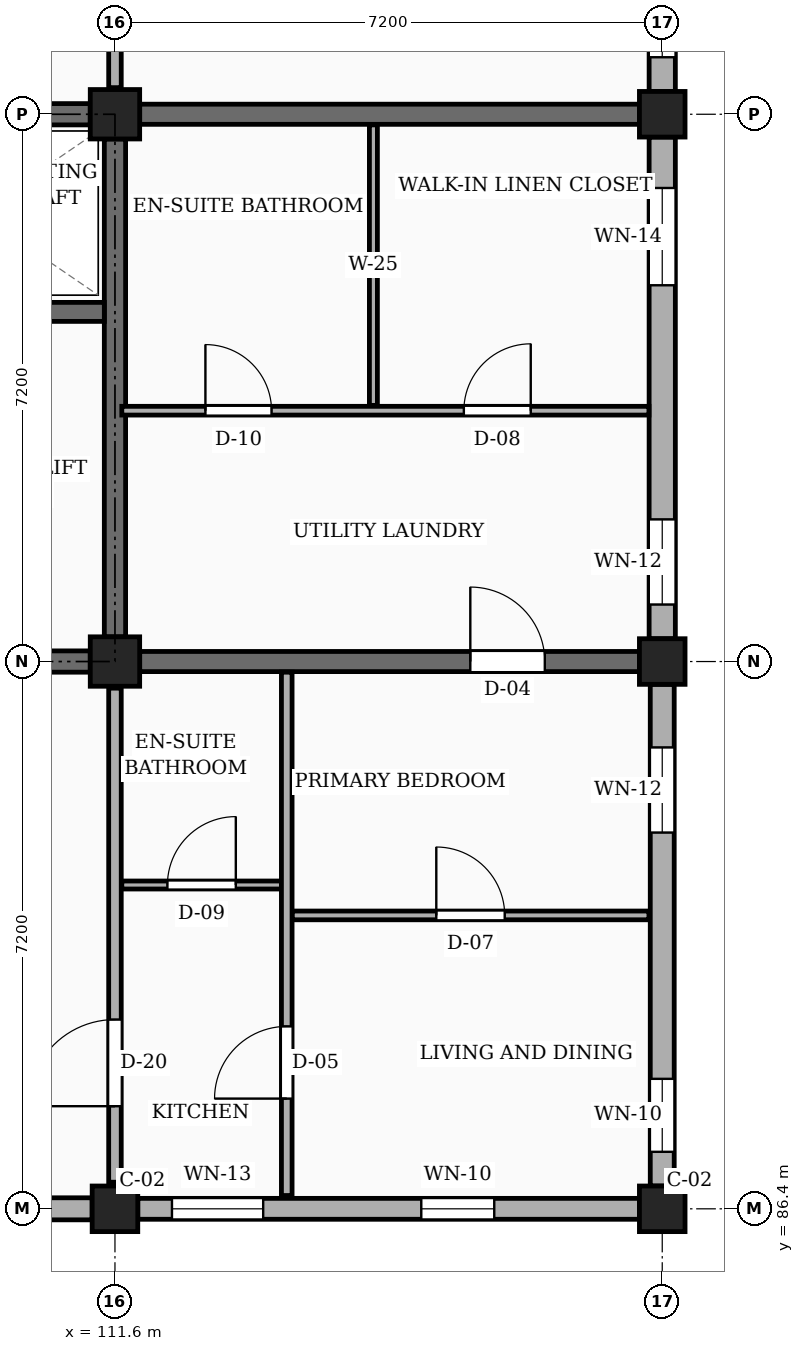
"""IFC4 building model, lengths in metres.
Left out: names, types, materials, properties, quantities, classifications, styles, units other than length and angle.
Written with IfcOpenShell. Run it as: python <this file> out.ifc"""

import sys

from ifc_helpers import new_model, si_unit, direction, frame, frame_2d, origin, origin_2d, place, context, subcontext, project, spatial, rectangle, extrude, element, fill, save


model = new_model("IFC4")
c1 = context("Model", 3, precision=1e-05, world=origin(), true_north=direction((0.0, 1.0)))
c2 = subcontext(c1, "Body", "Model", "MODEL_VIEW")
j1 = project(units=[si_unit("LENGTHUNIT", "METRE"), si_unit("PLANEANGLEUNIT", "RADIAN")], contexts=[c1])
p1 = place(None, origin())
s1 = spatial("IfcSite", under=j1, at=p1, CompositionType="ELEMENT")
p2 = place(p1, origin())
s2 = spatial("IfcBuilding", under=s1, at=p2, CompositionType="ELEMENT")
p3 = place(p2, frame((0.0, 0.0, 4.5)))
s3 = spatial("IfcBuildingStorey", under=s2, at=p3, CompositionType="ELEMENT", Elevation=4.5)
p4 = place(p3, frame((111.6, 86.4, 0.0), z_axis=(0.0, 0.0, 1.0), x_axis=(1.0, 0.0, 0.0)))
e1 = element("IfcColumn", 1, at=p4, inside=s3, PredefinedType="COLUMN", context=c2, shape_type="SweptSolid", body=[
    extrude(rectangle(XDim=0.6, YDim=0.6, at=origin_2d()), origin(), (0.0, 0.0, 1.0), 3.15),
])
for number, where, z_axis, x_axis in (
    (2, (111.6, 93.6, 0.0), (0.0, 0.0, 1.0), (1.0, 0.0, 0.0)),
    (3, (111.6, 100.8, 0.0), (0.0, 0.0, 1.0), (1.0, 0.0, 0.0)),
):
    element("IfcColumn", number, at=place(p3, frame(where, z_axis=z_axis, x_axis=x_axis)), inside=s3, PredefinedType="COLUMN", context=c2, shape_type="SweptSolid", body=[
        extrude(rectangle(XDim=0.65, YDim=0.65, at=origin_2d()), origin(), (0.0, 0.0, 1.0), 3.15),
    ])
for number, where, z_axis, x_axis in (
    (4, (118.8, 86.4, 0.0), (0.0, 0.0, 1.0), (1.0, 0.0, 0.0)),
    (5, (118.8, 93.6, 0.0), (0.0, 0.0, 1.0), (1.0, 0.0, 0.0)),
    (6, (118.8, 100.8, 0.0), (0.0, 0.0, 1.0), (1.0, 0.0, 0.0)),
):
    element("IfcColumn", number, at=place(p3, frame(where, z_axis=z_axis, x_axis=x_axis)), inside=s3, PredefinedType="COLUMN", context=c2, shape_type="SweptSolid", body=[
        extrude(rectangle(XDim=0.6, YDim=0.6, at=origin_2d()), origin(), (0.0, 0.0, 1.0), 3.15),
    ])
p5 = place(p3, frame((111.925, 93.6, 0.0), z_axis=(0.0, 0.0, 1.0), x_axis=(1.0, 0.0, 0.0)))
e7 = element("IfcWall", 7, at=p5, inside=s3, PredefinedType="SOLIDWALL", context=c2, shape_type="SweptSolid", body=[
    extrude(rectangle(XDim=6.575, YDim=0.265, at=frame_2d((3.288, 0.0))), origin(), (0.0, 0.0, 1.0), 2.19),
])
p6 = place(p5, frame((4.35, 0.0, 0.0)))
e8 = element("IfcOpeningElement", 8, at=p6, cuts=e7, PredefinedType="OPENING", context=c2, shape_type="SweptSolid", body=[
    extrude(rectangle(XDim=0.98, YDim=2.12, at=frame_2d((0.49, 1.06))), frame((0.0, 0.143, 0.0), z_axis=(0.0, -1.0, 0.0), x_axis=(1.0, 0.0, 0.0)), (0.0, 0.0, 1.0), 0.285),
])
p7 = place(p3, frame((111.925, 100.8, 0.0), z_axis=(0.0, 0.0, 1.0), x_axis=(1.0, 0.0, 0.0)))
e9 = element("IfcWall", 9, at=p7, inside=s3, PredefinedType="SOLIDWALL", context=c2, shape_type="SweptSolid", body=[
    extrude(rectangle(XDim=6.575, YDim=0.265, at=frame_2d((3.288, 0.0))), origin(), (0.0, 0.0, 1.0), 2.19),
])
p8 = place(p3, frame((104.7, 86.4, 0.0), z_axis=(0.0, 0.0, 1.0), x_axis=(1.0, 0.0, 0.0)))
e10 = element("IfcWall", 10, at=p8, inside=s3, PredefinedType="SOLIDWALL", context=c2, shape_type="SweptSolid", body=[
    extrude(rectangle(XDim=6.6, YDim=0.29, at=frame_2d((3.3, 0.0))), origin(), (0.0, 0.0, 1.0), 2.46),
])
p9 = place(p8, frame((0.45, 0.0, 0.78)))
e11 = element("IfcOpeningElement", 11, at=p9, cuts=e10, PredefinedType="OPENING", context=c2, shape_type="SweptSolid", body=[
    extrude(rectangle(XDim=1.24, YDim=1.15, at=frame_2d((0.62, 0.575))), frame((0.0, 0.155, 0.0), z_axis=(0.0, -1.0, 0.0), x_axis=(1.0, 0.0, 0.0)), (0.0, 0.0, 1.0), 0.31),
])
p10 = place(p8, frame((4.65, 0.0, 0.78)))
e12 = element("IfcOpeningElement", 12, at=p10, cuts=e10, PredefinedType="OPENING", context=c2, shape_type="SweptSolid", body=[
    extrude(rectangle(XDim=1.4, YDim=1.15, at=frame_2d((0.7, 0.575))), frame((0.0, 0.155, 0.0), z_axis=(0.0, -1.0, 0.0), x_axis=(1.0, 0.0, 0.0)), (0.0, 0.0, 1.0), 0.31),
])
p11 = place(p3, frame((111.9, 86.4, 0.0), z_axis=(0.0, 0.0, 1.0), x_axis=(1.0, 0.0, 0.0)))
e13 = element("IfcWall", 13, at=p11, inside=s3, PredefinedType="SOLIDWALL", context=c2, shape_type="SweptSolid", body=[
    extrude(rectangle(XDim=6.6, YDim=0.275, at=frame_2d((3.3, 0.0))), origin(), (0.0, 0.0, 1.0), 2.46),
])
p12 = place(p11, frame((0.45, 0.0, 0.78)))
e14 = element("IfcOpeningElement", 14, at=p12, cuts=e13, PredefinedType="OPENING", context=c2, shape_type="SweptSolid", body=[
    extrude(rectangle(XDim=1.2, YDim=1.26, at=frame_2d((0.6, 0.63))), frame((0.0, 0.147, 0.0), z_axis=(0.0, -1.0, 0.0), x_axis=(1.0, 0.0, 0.0)), (0.0, 0.0, 1.0), 0.295),
])
p13 = place(p11, frame((3.73, 0.0, 0.78)))
e15 = element("IfcOpeningElement", 15, at=p13, cuts=e13, PredefinedType="OPENING", context=c2, shape_type="SweptSolid", body=[
    extrude(rectangle(XDim=0.96, YDim=1.26, at=frame_2d((0.48, 0.63))), frame((0.0, 0.147, 0.0), z_axis=(0.0, -1.0, 0.0), x_axis=(1.0, 0.0, 0.0)), (0.0, 0.0, 1.0), 0.295),
])
p14 = place(p3, frame((118.8, 86.7, 0.0), z_axis=(0.0, 0.0, 1.0), x_axis=(0.0, 1.0, 0.0)))
e16 = element("IfcWall", 16, at=p14, inside=s3, PredefinedType="SOLIDWALL", context=c2, shape_type="SweptSolid", body=[
    extrude(rectangle(XDim=6.6, YDim=0.315, at=frame_2d((3.3, 0.0))), origin(), (0.0, 0.0, 1.0), 2.46),
])
p15 = place(p14, frame((0.45, 0.0, 0.78)))
e17 = element("IfcOpeningElement", 17, at=p15, cuts=e16, PredefinedType="OPENING", context=c2, shape_type="SweptSolid", body=[
    extrude(rectangle(XDim=0.96, YDim=1.26, at=frame_2d((0.48, 0.63))), frame((0.0, 0.167, 0.0), z_axis=(0.0, -1.0, 0.0), x_axis=(1.0, 0.0, 0.0)), (0.0, 0.0, 1.0), 0.335),
])
p16 = place(p14, frame((4.65, 0.0, 0.78)))
e18 = element("IfcOpeningElement", 18, at=p16, cuts=e16, PredefinedType="OPENING", context=c2, shape_type="SweptSolid", body=[
    extrude(rectangle(XDim=1.12, YDim=1.26, at=frame_2d((0.56, 0.63))), frame((0.0, 0.167, 0.0), z_axis=(0.0, -1.0, 0.0), x_axis=(1.0, 0.0, 0.0)), (0.0, 0.0, 1.0), 0.335),
])
p17 = place(p3, frame((118.8, 93.9, 0.0), z_axis=(0.0, 0.0, 1.0), x_axis=(0.0, 1.0, 0.0)))
e19 = element("IfcWall", 19, at=p17, inside=s3, PredefinedType="SOLIDWALL", context=c2, shape_type="SweptSolid", body=[
    extrude(rectangle(XDim=6.6, YDim=0.345, at=frame_2d((3.3, 0.0))), origin(), (0.0, 0.0, 1.0), 2.46),
])
p18 = place(p17, frame((0.45, 0.0, 0.78)))
e20 = element("IfcOpeningElement", 20, at=p18, cuts=e19, PredefinedType="OPENING", context=c2, shape_type="SweptSolid", body=[
    extrude(rectangle(XDim=1.12, YDim=1.26, at=frame_2d((0.56, 0.63))), frame((0.0, 0.183, 0.0), z_axis=(0.0, -1.0, 0.0), x_axis=(1.0, 0.0, 0.0)), (0.0, 0.0, 1.0), 0.365),
])
p19 = place(p17, frame((4.65, 0.0, 0.78)))
e21 = element("IfcOpeningElement", 21, at=p19, cuts=e19, PredefinedType="OPENING", context=c2, shape_type="SweptSolid", body=[
    extrude(rectangle(XDim=1.28, YDim=1.26, at=frame_2d((0.64, 0.63))), frame((0.0, 0.183, 0.0), z_axis=(0.0, -1.0, 0.0), x_axis=(1.0, 0.0, 0.0)), (0.0, 0.0, 1.0), 0.365),
])
p20 = place(p3, frame((118.8, 101.1, 0.0), z_axis=(0.0, 0.0, 1.0), x_axis=(0.0, 1.0, 0.0)))
e22 = element("IfcWall", 22, at=p20, inside=s3, PredefinedType="SOLIDWALL", context=c2, shape_type="SweptSolid", body=[
    extrude(rectangle(XDim=6.6, YDim=0.345, at=frame_2d((3.3, 0.0))), origin(), (0.0, 0.0, 1.0), 2.46),
])
p21 = place(p20, frame((0.45, 0.0, 0.78)))
e23 = element("IfcOpeningElement", 23, at=p21, cuts=e22, PredefinedType="OPENING", context=c2, shape_type="SweptSolid", body=[
    extrude(rectangle(XDim=1.28, YDim=1.26, at=frame_2d((0.64, 0.63))), frame((0.0, 0.183, 0.0), z_axis=(0.0, -1.0, 0.0), x_axis=(1.0, 0.0, 0.0)), (0.0, 0.0, 1.0), 0.365),
])
p22 = place(p20, frame((4.65, 0.0, 0.78)))
e24 = element("IfcOpeningElement", 24, at=p22, cuts=e22, PredefinedType="OPENING", context=c2, shape_type="SweptSolid", body=[
    extrude(rectangle(XDim=1.44, YDim=1.26, at=frame_2d((0.72, 0.63))), frame((0.0, 0.183, 0.0), z_axis=(0.0, -1.0, 0.0), x_axis=(1.0, 0.0, 0.0)), (0.0, 0.0, 1.0), 0.365),
])
p23 = place(p3, frame((104.725, 100.8, 0.0), z_axis=(0.0, 0.0, 1.0), x_axis=(1.0, 0.0, 0.0)))
e25 = element("IfcWall", 25, at=p23, inside=s3, PredefinedType="SHEAR", context=c2, shape_type="SweptSolid", body=[
    extrude(rectangle(XDim=6.55, YDim=0.28, at=frame_2d((3.275, 0.0))), origin(), (0.0, 0.0, 1.0), 2.89),
])
p24 = place(p3, frame((111.6, 93.925, 0.0), z_axis=(0.0, 0.0, 1.0), x_axis=(0.0, 1.0, 0.0)))
e26 = element("IfcWall", 26, at=p24, inside=s3, PredefinedType="SHEAR", context=c2, shape_type="SweptSolid", body=[
    extrude(rectangle(XDim=6.55, YDim=0.28, at=frame_2d((3.275, 0.0))), origin(), (0.0, 0.0, 1.0), 2.89),
])
p25 = place(p3, frame((104.725, 93.6, 0.0), z_axis=(0.0, 0.0, 1.0), x_axis=(1.0, 0.0, 0.0)))
e27 = element("IfcWall", 27, at=p25, inside=s3, PredefinedType="SHEAR", context=c2, shape_type="SweptSolid", body=[
    extrude(rectangle(XDim=6.55, YDim=0.28, at=frame_2d((3.275, 0.0))), origin(), (0.0, 0.0, 1.0), 2.89),
])
p26 = place(p25, frame((4.425, 0.0, 0.0)))
e28 = element("IfcOpeningElement", 28, at=p26, cuts=e27, PredefinedType="OPENING", context=c2, shape_type="SweptSolid", body=[
    extrude(rectangle(XDim=1.1, YDim=2.15, at=frame_2d((0.55, 1.075))), frame((0.0, 0.15, 0.0), z_axis=(0.0, -1.0, 0.0), x_axis=(1.0, 0.0, 0.0)), (0.0, 0.0, 1.0), 0.3),
])
p27 = place(p3, frame((108.125, 98.2, 0.0), z_axis=(0.0, 0.0, 1.0), x_axis=(1.0, 0.0, 0.0)))
e29 = element("IfcWall", 29, at=p27, inside=s3, PredefinedType="SHEAR", context=c2, shape_type="SweptSolid", body=[
    extrude(rectangle(XDim=3.335, YDim=0.25, at=frame_2d((1.667, 0.0))), origin(), (0.0, 0.0, 1.0), 2.89),
])
p28 = place(p27, frame((1.1, 0.0, 0.0)))
e30 = element("IfcOpeningElement", 30, at=p28, cuts=e29, PredefinedType="OPENING", context=c2, shape_type="SweptSolid", body=[
    extrude(rectangle(XDim=1.1, YDim=2.2, at=frame_2d((0.55, 1.1))), frame((0.0, 0.135, 0.0), z_axis=(0.0, -1.0, 0.0), x_axis=(1.0, 0.0, 0.0)), (0.0, 0.0, 1.0), 0.27),
])
p29 = place(p3, frame((111.6, 86.75, 0.0), z_axis=(0.0, 0.0, 1.0), x_axis=(0.0, 1.0, 0.0)))
e31 = element("IfcWall", 31, at=p29, inside=s3, PredefinedType="PARTITIONING", context=c2, shape_type="SweptSolid", body=[
    extrude(rectangle(XDim=6.5, YDim=0.165, at=frame_2d((3.25, 0.0))), origin(), (0.0, 0.0, 1.0), 2.24),
])
p30 = place(p29, frame((1.0, 0.0, 0.0)))
e32 = element("IfcOpeningElement", 32, at=p30, cuts=e31, PredefinedType="OPENING", context=c2, shape_type="SweptSolid", body=[
    extrude(rectangle(XDim=1.14, YDim=2.18, at=frame_2d((0.57, 1.09))), frame((0.0, 0.093, 0.0), z_axis=(0.0, -1.0, 0.0), x_axis=(1.0, 0.0, 0.0)), (0.0, 0.0, 1.0), 0.185),
])
p31 = place(p3, frame((111.6, 101.15, 0.0), z_axis=(0.0, 0.0, 1.0), x_axis=(0.0, 1.0, 0.0)))
e33 = element("IfcWall", 33, at=p31, inside=s3, PredefinedType="PARTITIONING", context=c2, shape_type="SweptSolid", body=[
    extrude(rectangle(XDim=6.5, YDim=0.165, at=frame_2d((3.25, 0.0))), origin(), (0.0, 0.0, 1.0), 2.24),
])
p32 = place(p31, frame((1.1, 0.0, 0.0)))
e34 = element("IfcOpeningElement", 34, at=p32, cuts=e33, PredefinedType="OPENING", context=c2, shape_type="SweptSolid", body=[
    extrude(rectangle(XDim=1.0, YDim=2.15, at=frame_2d((0.5, 1.075))), frame((0.0, 0.093, 0.0), z_axis=(0.0, -1.0, 0.0), x_axis=(1.0, 0.0, 0.0)), (0.0, 0.0, 1.0), 0.185),
])
p33 = place(p3, frame((113.93, 90.26, 0.0), z_axis=(0.0, 0.0, 1.0), x_axis=(1.0, 0.0, 0.0)))
e35 = element("IfcWall", 35, at=p33, inside=s3, PredefinedType="PARTITIONING", context=c2, shape_type="SweptSolid", body=[
    extrude(rectangle(XDim=4.695, YDim=0.115, at=frame_2d((2.348, 0.0))), origin(), (0.0, 0.0, 1.0), 2.325),
])
p34 = place(p33, frame((1.897, 0.0, 0.0)))
e36 = element("IfcOpeningElement", 36, at=p34, cuts=e35, PredefinedType="OPENING", context=c2, shape_type="SweptSolid", body=[
    extrude(rectangle(XDim=0.9, YDim=2.1, at=frame_2d((0.45, 1.05))), frame((0.0, 0.067, 0.0), z_axis=(0.0, -1.0, 0.0), x_axis=(1.0, 0.0, 0.0)), (0.0, 0.0, 1.0), 0.135),
])
p35 = place(p3, frame((111.69, 90.66, 0.0), z_axis=(0.0, 0.0, 1.0), x_axis=(1.0, 0.0, 0.0)))
e37 = element("IfcWall", 37, at=p35, inside=s3, PredefinedType="PARTITIONING", context=c2, shape_type="SweptSolid", body=[
    extrude(rectangle(XDim=2.1, YDim=0.105, at=frame_2d((1.05, 0.0))), origin(), (0.0, 0.0, 1.0), 2.325),
])
p36 = place(p35, frame((0.6, 0.0, 0.0)))
e38 = element("IfcOpeningElement", 38, at=p36, cuts=e37, PredefinedType="OPENING", context=c2, shape_type="SweptSolid", body=[
    extrude(rectangle(XDim=0.9, YDim=2.05, at=frame_2d((0.45, 1.025))), frame((0.0, 0.062, 0.0), z_axis=(0.0, -1.0, 0.0), x_axis=(1.0, 0.0, 0.0)), (0.0, 0.0, 1.0), 0.125),
])
p37 = place(p3, frame((113.86, 86.575, 0.0), z_axis=(0.0, 0.0, 1.0), x_axis=(0.0, 1.0, 0.0)))
e39 = element("IfcWall", 39, at=p37, inside=s3, PredefinedType="PARTITIONING", context=c2, shape_type="SweptSolid", body=[
    extrude(rectangle(XDim=6.885, YDim=0.14, at=frame_2d((3.442, 0.0))), origin(), (0.0, 0.0, 1.0), 2.325),
])
p38 = place(p37, frame((1.275, 0.0, 0.0)))
e40 = element("IfcOpeningElement", 40, at=p38, cuts=e39, PredefinedType="OPENING", context=c2, shape_type="SweptSolid", body=[
    extrude(rectangle(XDim=0.95, YDim=2.1, at=frame_2d((0.475, 1.05))), frame((0.0, 0.08, 0.0), z_axis=(0.0, -1.0, 0.0), x_axis=(1.0, 0.0, 0.0)), (0.0, 0.0, 1.0), 0.16),
])
p39 = place(p3, frame((111.69, 96.9, 0.0), z_axis=(0.0, 0.0, 1.0), x_axis=(1.0, 0.0, 0.0)))
e41 = element("IfcWall", 41, at=p39, inside=s3, PredefinedType="PARTITIONING", context=c2, shape_type="SweptSolid", body=[
    extrude(rectangle(XDim=6.935, YDim=0.115, at=frame_2d((3.468, 0.0))), origin(), (0.0, 0.0, 1.0), 2.325),
])
p40 = place(p39, frame((1.1, 0.0, 0.0)))
e42 = element("IfcOpeningElement", 42, at=p40, cuts=e41, PredefinedType="OPENING", context=c2, shape_type="SweptSolid", body=[
    extrude(rectangle(XDim=0.87, YDim=2.05, at=frame_2d((0.435, 1.025))), frame((0.0, 0.067, 0.0), z_axis=(0.0, -1.0, 0.0), x_axis=(1.0, 0.0, 0.0)), (0.0, 0.0, 1.0), 0.135),
])
p41 = place(p39, frame((4.5, 0.0, 0.0)))
e43 = element("IfcOpeningElement", 43, at=p41, cuts=e41, PredefinedType="OPENING", context=c2, shape_type="SweptSolid", body=[
    extrude(rectangle(XDim=0.88, YDim=2.08, at=frame_2d((0.44, 1.04))), frame((0.0, 0.067, 0.0), z_axis=(0.0, -1.0, 0.0), x_axis=(1.0, 0.0, 0.0)), (0.0, 0.0, 1.0), 0.135),
])
p42 = place(p3, frame((115.0, 96.97, 0.0), z_axis=(0.0, 0.0, 1.0), x_axis=(0.0, 1.0, 0.0)))
e44 = element("IfcWall", 44, at=p42, inside=s3, PredefinedType="PARTITIONING", context=c2, shape_type="SweptSolid", body=[
    extrude(rectangle(XDim=3.69, YDim=0.105, at=frame_2d((1.845, 0.0))), origin(), (0.0, 0.0, 1.0), 2.325),
])
p43 = place(p12, origin())
e45 = element("IfcWindow", 45, at=p43, inside=s3, PartitioningType="SINGLE_PANEL", PredefinedType="WINDOW", context=c2, shape_type="SweptSolid", body=[
    extrude(rectangle(XDim=1.2, YDim=1.26, at=frame_2d((0.6, 0.63))), frame((0.0, 0.03, 0.0), z_axis=(0.0, -1.0, 0.0), x_axis=(1.0, 0.0, 0.0)), (0.0, 0.0, 1.0), 0.06),
])
fill(e14, e45)
p44 = place(p13, origin())
e46 = element("IfcWindow", 46, at=p44, inside=s3, PartitioningType="SINGLE_PANEL", PredefinedType="WINDOW", context=c2, shape_type="SweptSolid", body=[
    extrude(rectangle(XDim=0.96, YDim=1.26, at=frame_2d((0.48, 0.63))), frame((0.0, 0.03, 0.0), z_axis=(0.0, -1.0, 0.0), x_axis=(1.0, 0.0, 0.0)), (0.0, 0.0, 1.0), 0.06),
])
fill(e15, e46)
p45 = place(p15, origin())
e47 = element("IfcWindow", 47, at=p45, inside=s3, PartitioningType="SINGLE_PANEL", PredefinedType="WINDOW", context=c2, shape_type="SweptSolid", body=[
    extrude(rectangle(XDim=0.96, YDim=1.26, at=frame_2d((0.48, 0.63))), frame((0.0, 0.03, 0.0), z_axis=(0.0, -1.0, 0.0), x_axis=(1.0, 0.0, 0.0)), (0.0, 0.0, 1.0), 0.06),
])
fill(e17, e47)
p46 = place(p16, origin())
e48 = element("IfcWindow", 48, at=p46, inside=s3, PartitioningType="SINGLE_PANEL", PredefinedType="WINDOW", context=c2, shape_type="SweptSolid", body=[
    extrude(rectangle(XDim=1.12, YDim=1.26, at=frame_2d((0.56, 0.63))), frame((0.0, 0.03, 0.0), z_axis=(0.0, -1.0, 0.0), x_axis=(1.0, 0.0, 0.0)), (0.0, 0.0, 1.0), 0.06),
])
fill(e18, e48)
p47 = place(p18, origin())
e49 = element("IfcWindow", 49, at=p47, inside=s3, PartitioningType="SINGLE_PANEL", PredefinedType="WINDOW", context=c2, shape_type="SweptSolid", body=[
    extrude(rectangle(XDim=1.12, YDim=1.26, at=frame_2d((0.56, 0.63))), frame((0.0, 0.03, 0.0), z_axis=(0.0, -1.0, 0.0), x_axis=(1.0, 0.0, 0.0)), (0.0, 0.0, 1.0), 0.06),
])
fill(e20, e49)
p48 = place(p19, origin())
e50 = element("IfcWindow", 50, at=p48, inside=s3, PartitioningType="SINGLE_PANEL", PredefinedType="WINDOW", context=c2, shape_type="SweptSolid", body=[
    extrude(rectangle(XDim=1.28, YDim=1.26, at=frame_2d((0.64, 0.63))), frame((0.0, 0.03, 0.0), z_axis=(0.0, -1.0, 0.0), x_axis=(1.0, 0.0, 0.0)), (0.0, 0.0, 1.0), 0.06),
])
fill(e21, e50)
p49 = place(p21, origin())
e51 = element("IfcWindow", 51, at=p49, inside=s3, PartitioningType="SINGLE_PANEL", PredefinedType="WINDOW", context=c2, shape_type="SweptSolid", body=[
    extrude(rectangle(XDim=1.28, YDim=1.26, at=frame_2d((0.64, 0.63))), frame((0.0, 0.03, 0.0), z_axis=(0.0, -1.0, 0.0), x_axis=(1.0, 0.0, 0.0)), (0.0, 0.0, 1.0), 0.06),
])
fill(e23, e51)
p50 = place(p30, origin())
e52 = element("IfcDoor", 52, at=p50, inside=s3, OperationType="SINGLE_SWING_LEFT", PredefinedType="DOOR", context=c2, shape_type="SweptSolid", body=[
    extrude(rectangle(XDim=1.14, YDim=2.18, at=frame_2d((0.57, 1.09))), frame((0.0, 0.025, 0.0), z_axis=(0.0, -1.0, 0.0), x_axis=(1.0, 0.0, 0.0)), (0.0, 0.0, 1.0), 0.05),
])
fill(e32, e52)
p51 = place(p34, origin())
e53 = element("IfcDoor", 53, at=p51, inside=s3, OperationType="SINGLE_SWING_LEFT", PredefinedType="DOOR", context=c2, shape_type="SweptSolid", body=[
    extrude(rectangle(XDim=0.9, YDim=2.1, at=frame_2d((0.45, 1.05))), frame((0.0, 0.025, 0.0), z_axis=(0.0, -1.0, 0.0), x_axis=(1.0, 0.0, 0.0)), (0.0, 0.0, 1.0), 0.05),
])
fill(e36, e53)
p52 = place(p36, origin())
e54 = element("IfcDoor", 54, at=p52, inside=s3, OperationType="SINGLE_SWING_RIGHT", PredefinedType="DOOR", context=c2, shape_type="SweptSolid", body=[
    extrude(rectangle(XDim=0.9, YDim=2.05, at=frame_2d((0.45, 1.025))), frame((0.0, 0.025, 0.0), z_axis=(0.0, -1.0, 0.0), x_axis=(1.0, 0.0, 0.0)), (0.0, 0.0, 1.0), 0.05),
])
fill(e38, e54)
p53 = place(p38, origin())
e55 = element("IfcDoor", 55, at=p53, inside=s3, OperationType="SINGLE_SWING_LEFT", PredefinedType="DOOR", context=c2, shape_type="SweptSolid", body=[
    extrude(rectangle(XDim=0.95, YDim=2.1, at=frame_2d((0.475, 1.05))), frame((0.0, 0.025, 0.0), z_axis=(0.0, -1.0, 0.0), x_axis=(1.0, 0.0, 0.0)), (0.0, 0.0, 1.0), 0.05),
])
fill(e40, e55)
p54 = place(p40, origin())
e56 = element("IfcDoor", 56, at=p54, inside=s3, OperationType="SINGLE_SWING_LEFT", PredefinedType="DOOR", context=c2, shape_type="SweptSolid", body=[
    extrude(rectangle(XDim=0.87, YDim=2.05, at=frame_2d((0.435, 1.025))), frame((0.0, 0.025, 0.0), z_axis=(0.0, -1.0, 0.0), x_axis=(1.0, 0.0, 0.0)), (0.0, 0.0, 1.0), 0.05),
])
fill(e42, e56)
p55 = place(p41, origin())
e57 = element("IfcDoor", 57, at=p55, inside=s3, OperationType="SINGLE_SWING_RIGHT", PredefinedType="DOOR", context=c2, shape_type="SweptSolid", body=[
    extrude(rectangle(XDim=0.88, YDim=2.08, at=frame_2d((0.44, 1.04))), frame((0.0, 0.025, 0.0), z_axis=(0.0, -1.0, 0.0), x_axis=(1.0, 0.0, 0.0)), (0.0, 0.0, 1.0), 0.05),
])
fill(e43, e57)
p56 = place(p6, origin())
e58 = element("IfcDoor", 58, at=p56, inside=s3, OperationType="SINGLE_SWING_LEFT", PredefinedType="DOOR", context=c2, shape_type="SweptSolid", body=[
    extrude(rectangle(XDim=0.98, YDim=2.12, at=frame_2d((0.49, 1.06))), frame((0.0, 0.025, 0.0), z_axis=(0.0, -1.0, 0.0), x_axis=(1.0, 0.0, 0.0)), (0.0, 0.0, 1.0), 0.05),
])
fill(e8, e58)
save(model, sys.argv[1])
